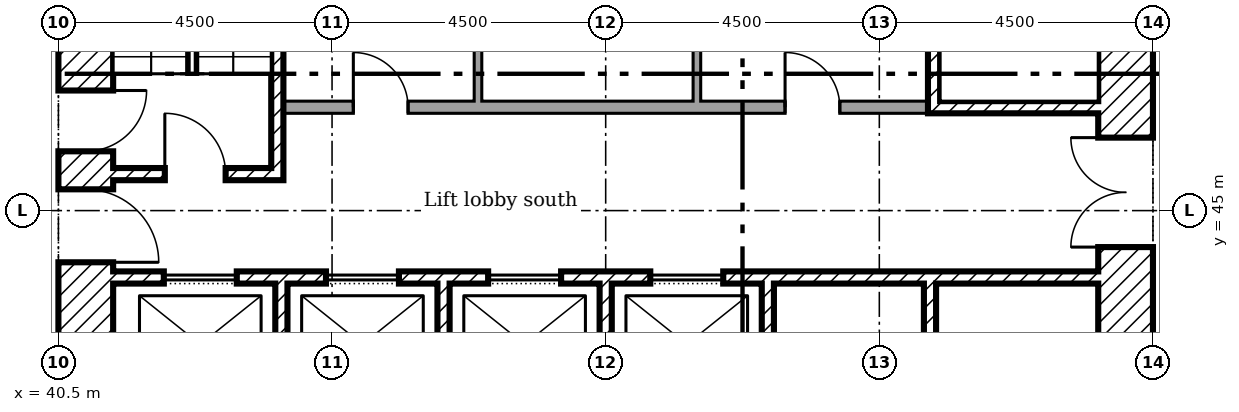
"""IFC4 building model, lengths in metres.
Left out: names, types, materials, properties, quantities, classifications, styles, units other than length and angle.
Written with IfcOpenShell. Run it as: python <this file> out.ifc"""

import sys

from ifc_helpers import new_model, si_unit, direction, frame, frame_2d, origin, place, context, subcontext, project, spatial, rectangle, extrude, element, fill, save


model = new_model("IFC4")
c1 = context("Model", 3, precision=1e-05, world=origin(), true_north=direction((0.0, 1.0)))
c2 = subcontext(c1, "Body", "Model", "MODEL_VIEW")
j1 = project(units=[si_unit("LENGTHUNIT", "METRE"), si_unit("PLANEANGLEUNIT", "RADIAN")], contexts=[c1])
p1 = place(None, origin())
s1 = spatial("IfcSite", under=j1, at=p1, CompositionType="ELEMENT")
p2 = place(p1, origin())
s2 = spatial("IfcBuilding", under=s1, at=p2, CompositionType="ELEMENT")
p3 = place(p2, frame((0.0, 0.0, 21.0)))
s3 = spatial("IfcBuildingStorey", under=s2, at=p3, CompositionType="ELEMENT", Elevation=21.0)
p4 = place(p3, frame((58.05, 40.5, 0.0), z_axis=(0.0, 0.0, 1.0), x_axis=(0.0, 1.0, 0.0)))
e1 = element("IfcWall", 1, at=p4, inside=s3, PredefinedType="SHEAR", context=c2, shape_type="SweptSolid", body=[
    extrude(rectangle(XDim=18.0, YDim=0.9, at=frame_2d((9.0, 0.0))), origin(), (0.0, 0.0, 1.0), 4.125),
])
p5 = place(p4, frame((13.15, 0.0, 0.0)))
e2 = element("IfcOpeningElement", 2, at=p5, cuts=e1, PredefinedType="OPENING", context=c2, shape_type="SweptSolid", body=[
    extrude(rectangle(XDim=1.2, YDim=2.1, at=frame_2d((0.6, 1.05))), frame((0.0, 0.46, 0.0), z_axis=(0.0, -1.0, 0.0), x_axis=(1.0, 0.0, 0.0)), (0.0, 0.0, 1.0), 0.92),
])
p6 = place(p4, frame((3.9, 0.0, 0.0)))
e3 = element("IfcOpeningElement", 3, at=p6, cuts=e1, PredefinedType="OPENING", context=c2, shape_type="SweptSolid", body=[
    extrude(rectangle(XDim=1.8, YDim=2.1, at=frame_2d((0.9, 1.05))), frame((0.0, 0.46, 0.0), z_axis=(0.0, -1.0, 0.0), x_axis=(1.0, 0.0, 0.0)), (0.0, 0.0, 1.0), 0.92),
])
p7 = place(p4, frame((11.525, 0.0, 0.0)))
e4 = element("IfcOpeningElement", 4, at=p7, cuts=e1, PredefinedType="OPENING", context=c2, shape_type="SweptSolid", body=[
    extrude(rectangle(XDim=1.0, YDim=2.1, at=frame_2d((0.5, 1.05))), frame((0.0, 0.46, 0.0), z_axis=(0.0, -1.0, 0.0), x_axis=(1.0, 0.0, 0.0)), (0.0, 0.0, 1.0), 0.92),
])
p8 = place(p3, frame((40.95, 40.5, 0.0), z_axis=(0.0, 0.0, 1.0), x_axis=(0.0, 1.0, 0.0)))
e5 = element("IfcWall", 5, at=p8, inside=s3, PredefinedType="SHEAR", context=c2, shape_type="SweptSolid", body=[
    extrude(rectangle(XDim=18.0, YDim=0.9, at=frame_2d((9.0, 0.0))), origin(), (0.0, 0.0, 1.0), 4.125),
])
p9 = place(p8, frame((3.65, 0.0, 0.0)))
e6 = element("IfcOpeningElement", 6, at=p9, cuts=e5, PredefinedType="OPENING", context=c2, shape_type="SweptSolid", body=[
    extrude(rectangle(XDim=1.2, YDim=2.1, at=frame_2d((0.6, 1.05))), frame((0.0, 0.46, 0.0), z_axis=(0.0, -1.0, 0.0), x_axis=(1.0, 0.0, 0.0)), (0.0, 0.0, 1.0), 0.92),
])
p10 = place(p8, frame((5.475, 0.0, 0.0)))
e7 = element("IfcOpeningElement", 7, at=p10, cuts=e5, PredefinedType="OPENING", context=c2, shape_type="SweptSolid", body=[
    extrude(rectangle(XDim=1.0, YDim=2.1, at=frame_2d((0.5, 1.05))), frame((0.0, 0.46, 0.0), z_axis=(0.0, -1.0, 0.0), x_axis=(1.0, 0.0, 0.0)), (0.0, 0.0, 1.0), 0.92),
])
p11 = place(p8, frame((12.3, 0.0, 0.0)))
e8 = element("IfcOpeningElement", 8, at=p11, cuts=e5, PredefinedType="OPENING", context=c2, shape_type="SweptSolid", body=[
    extrude(rectangle(XDim=1.0, YDim=2.1, at=frame_2d((0.5, 1.05))), frame((0.0, 0.46, 0.0), z_axis=(0.0, -1.0, 0.0), x_axis=(1.0, 0.0, 0.0)), (0.0, 0.0, 1.0), 0.92),
])
for number, where, z_axis, x_axis in (
    (9, (44.167, 41.4, 0.0), (0.0, 0.0, 1.0), (0.0, 1.0, 0.0)),
    (10, (46.833, 41.4, 0.0), (0.0, 0.0, 1.0), (0.0, 1.0, 0.0)),
    (11, (49.5, 41.4, 0.0), (0.0, 0.0, 1.0), (0.0, 1.0, 0.0)),
    (12, (52.167, 41.4, 0.0), (0.0, 0.0, 1.0), (0.0, 1.0, 0.0)),
    (13, (54.833, 41.4, 0.0), (0.0, 0.0, 1.0), (0.0, 1.0, 0.0)),
):
    element("IfcWall", number, at=place(p3, frame(where, z_axis=z_axis, x_axis=x_axis)), inside=s3, PredefinedType="SHEAR", context=c2, shape_type="SweptSolid", body=[
        extrude(rectangle(XDim=2.4, YDim=0.2, at=frame_2d((1.2, 0.0))), origin(), (0.0, 0.0, 1.0), 4.125),
    ])
p12 = place(p3, frame((41.4, 43.9, 0.0)))
e14 = element("IfcWall", 14, at=p12, inside=s3, PredefinedType="SHEAR", context=c2, shape_type="SweptSolid", body=[
    extrude(rectangle(XDim=16.2, YDim=0.2, at=frame_2d((8.1, 0.0))), origin(), (0.0, 0.0, 1.0), 4.125),
])
p13 = place(p12, frame((0.833, 0.0, 0.0)))
e15 = element("IfcOpeningElement", 15, at=p13, cuts=e14, PredefinedType="OPENING", context=c2, shape_type="SweptSolid", body=[
    extrude(rectangle(XDim=1.2, YDim=2.1, at=frame_2d((0.6, 1.05))), frame((0.0, 0.11, 0.0), z_axis=(0.0, -1.0, 0.0), x_axis=(1.0, 0.0, 0.0)), (0.0, 0.0, 1.0), 0.22),
])
p14 = place(p12, frame((3.5, 0.0, 0.0)))
e16 = element("IfcOpeningElement", 16, at=p14, cuts=e14, PredefinedType="OPENING", context=c2, shape_type="SweptSolid", body=[
    extrude(rectangle(XDim=1.2, YDim=2.1, at=frame_2d((0.6, 1.05))), frame((0.0, 0.11, 0.0), z_axis=(0.0, -1.0, 0.0), x_axis=(1.0, 0.0, 0.0)), (0.0, 0.0, 1.0), 0.22),
])
p15 = place(p12, frame((6.167, 0.0, 0.0)))
e17 = element("IfcOpeningElement", 17, at=p15, cuts=e14, PredefinedType="OPENING", context=c2, shape_type="SweptSolid", body=[
    extrude(rectangle(XDim=1.2, YDim=2.1, at=frame_2d((0.6, 1.05))), frame((0.0, 0.11, 0.0), z_axis=(0.0, -1.0, 0.0), x_axis=(1.0, 0.0, 0.0)), (0.0, 0.0, 1.0), 0.22),
])
p16 = place(p12, frame((8.833, 0.0, 0.0)))
e18 = element("IfcOpeningElement", 18, at=p16, cuts=e14, PredefinedType="OPENING", context=c2, shape_type="SweptSolid", body=[
    extrude(rectangle(XDim=1.2, YDim=2.1, at=frame_2d((0.6, 1.05))), frame((0.0, 0.11, 0.0), z_axis=(0.0, -1.0, 0.0), x_axis=(1.0, 0.0, 0.0)), (0.0, 0.0, 1.0), 0.22),
])
p17 = place(p3, frame((44.1, 45.5, 0.0), z_axis=(0.0, 0.0, 1.0), x_axis=(0.0, 1.0, 0.0)))
e19 = element("IfcWall", 19, at=p17, inside=s3, PredefinedType="SHEAR", context=c2, shape_type="SweptSolid", body=[
    extrude(rectangle(XDim=6.9, YDim=0.2, at=frame_2d((3.45, 0.0))), origin(), (0.0, 0.0, 1.0), 4.125),
])
p18 = place(p3, frame((41.4, 45.6, 0.0)))
e20 = element("IfcWall", 20, at=p18, inside=s3, PredefinedType="SHEAR", context=c2, shape_type="SweptSolid", body=[
    extrude(rectangle(XDim=2.6, YDim=0.2, at=frame_2d((1.3, 0.0))), origin(), (0.0, 0.0, 1.0), 4.125),
])
p19 = place(p18, frame((0.85, 0.0, 0.0)))
e21 = element("IfcOpeningElement", 21, at=p19, cuts=e20, PredefinedType="OPENING", context=c2, shape_type="SweptSolid", body=[
    extrude(rectangle(XDim=1.0, YDim=2.1, at=frame_2d((0.5, 1.05))), frame((0.0, 0.11, 0.0), z_axis=(0.0, -1.0, 0.0), x_axis=(1.0, 0.0, 0.0)), (0.0, 0.0, 1.0), 0.22),
])
p20 = place(p3, frame((54.8, 46.7, 0.0)))
e22 = element("IfcWall", 22, at=p20, inside=s3, PredefinedType="SHEAR", context=c2, shape_type="SweptSolid", body=[
    extrude(rectangle(XDim=2.8, YDim=0.2, at=frame_2d((1.4, 0.0))), origin(), (0.0, 0.0, 1.0), 4.125),
])
p21 = place(p3, frame((54.9, 46.8, 0.0), z_axis=(0.0, 0.0, 1.0), x_axis=(0.0, 1.0, 0.0)))
e23 = element("IfcWall", 23, at=p21, inside=s3, PredefinedType="SHEAR", context=c2, shape_type="SweptSolid", body=[
    extrude(rectangle(XDim=6.5, YDim=0.2, at=frame_2d((3.25, 0.0))), origin(), (0.0, 0.0, 1.0), 4.125),
])
p22 = place(p3, frame((44.2, 46.7, 0.0)))
e24 = element("IfcWall", 24, at=p22, inside=s3, PredefinedType="PARTITIONING", context=c2, shape_type="SweptSolid", body=[
    extrude(rectangle(XDim=10.6, YDim=0.2, at=frame_2d((5.3, 0.0))), origin(), (0.0, 0.0, 1.0), 4.125),
])
p23 = place(p22, frame((1.15, 0.0, 0.0)))
e25 = element("IfcOpeningElement", 25, at=p23, cuts=e24, PredefinedType="OPENING", context=c2, shape_type="SweptSolid", body=[
    extrude(rectangle(XDim=0.9, YDim=2.1, at=frame_2d((0.45, 1.05))), frame((0.0, 0.11, 0.0), z_axis=(0.0, -1.0, 0.0), x_axis=(1.0, 0.0, 0.0)), (0.0, 0.0, 1.0), 0.22),
])
p24 = place(p22, frame((8.25, 0.0, 0.0)))
e26 = element("IfcOpeningElement", 26, at=p24, cuts=e24, PredefinedType="OPENING", context=c2, shape_type="SweptSolid", body=[
    extrude(rectangle(XDim=0.9, YDim=2.1, at=frame_2d((0.45, 1.05))), frame((0.0, 0.11, 0.0), z_axis=(0.0, -1.0, 0.0), x_axis=(1.0, 0.0, 0.0)), (0.0, 0.0, 1.0), 0.22),
])
p25 = place(p3, frame((47.4, 46.8, 0.0), z_axis=(0.0, 0.0, 1.0), x_axis=(0.0, 1.0, 0.0)))
e27 = element("IfcWall", 27, at=p25, inside=s3, PredefinedType="PARTITIONING", context=c2, shape_type="SweptSolid", body=[
    extrude(rectangle(XDim=5.0, YDim=0.125, at=frame_2d((2.5, 0.0))), origin(), (0.0, 0.0, 1.0), 4.125),
])
p26 = place(p3, frame((51.0, 46.8, 0.0), z_axis=(0.0, 0.0, 1.0), x_axis=(0.0, 1.0, 0.0)))
e28 = element("IfcWall", 28, at=p26, inside=s3, PredefinedType="PARTITIONING", context=c2, shape_type="SweptSolid", body=[
    extrude(rectangle(XDim=2.262, YDim=0.125, at=frame_2d((1.131, 0.0))), origin(), (0.0, 0.0, 1.0), 4.125),
])
p27 = place(p6, origin())
e29 = element("IfcDoor", 29, at=p27, inside=s3, OperationType="DOUBLE_DOOR_SINGLE_SWING", PredefinedType="DOOR", context=c2, shape_type="SweptSolid", body=[
    extrude(rectangle(XDim=1.8, YDim=2.1, at=frame_2d((0.9, 1.05))), frame((0.0, 0.025, 0.0), z_axis=(0.0, -1.0, 0.0), x_axis=(1.0, 0.0, 0.0)), (0.0, 0.0, 1.0), 0.05),
])
fill(e3, e29)
p28 = place(p9, frame((1.2, 0.0, 0.0), x_axis=(-1.0, 0.0, 0.0)))
e30 = element("IfcDoor", 30, at=p28, inside=s3, OperationType="SINGLE_SWING_LEFT", PredefinedType="DOOR", context=c2, shape_type="SweptSolid", body=[
    extrude(rectangle(XDim=1.2, YDim=2.1, at=frame_2d((0.6, 1.05))), frame((0.0, 0.025, 0.0), z_axis=(0.0, -1.0, 0.0), x_axis=(1.0, 0.0, 0.0)), (0.0, 0.0, 1.0), 0.05),
])
fill(e6, e30)
p29 = place(p19, origin())
e31 = element("IfcDoor", 31, at=p29, inside=s3, OperationType="SINGLE_SWING_RIGHT", PredefinedType="DOOR", context=c2, shape_type="SweptSolid", body=[
    extrude(rectangle(XDim=1.0, YDim=2.1, at=frame_2d((0.5, 1.05))), frame((0.0, 0.025, 0.0), z_axis=(0.0, -1.0, 0.0), x_axis=(1.0, 0.0, 0.0)), (0.0, 0.0, 1.0), 0.05),
])
fill(e21, e31)
p30 = place(p10, frame((1.0, 0.0, 0.0), x_axis=(-1.0, 0.0, 0.0)))
e32 = element("IfcDoor", 32, at=p30, inside=s3, OperationType="SINGLE_SWING_RIGHT", PredefinedType="DOOR", context=c2, shape_type="SweptSolid", body=[
    extrude(rectangle(XDim=1.0, YDim=2.1, at=frame_2d((0.5, 1.05))), frame((0.0, 0.025, 0.0), z_axis=(0.0, -1.0, 0.0), x_axis=(1.0, 0.0, 0.0)), (0.0, 0.0, 1.0), 0.05),
])
fill(e7, e32)
p31 = place(p23, origin())
e33 = element("IfcDoor", 33, at=p31, inside=s3, OperationType="SINGLE_SWING_RIGHT", PredefinedType="DOOR", context=c2, shape_type="SweptSolid", body=[
    extrude(rectangle(XDim=0.9, YDim=2.1, at=frame_2d((0.45, 1.05))), frame((0.0, 0.025, 0.0), z_axis=(0.0, -1.0, 0.0), x_axis=(1.0, 0.0, 0.0)), (0.0, 0.0, 1.0), 0.05),
])
fill(e25, e33)
p32 = place(p24, origin())
e34 = element("IfcDoor", 34, at=p32, inside=s3, OperationType="SINGLE_SWING_RIGHT", PredefinedType="DOOR", context=c2, shape_type="SweptSolid", body=[
    extrude(rectangle(XDim=0.9, YDim=2.1, at=frame_2d((0.45, 1.05))), frame((0.0, 0.025, 0.0), z_axis=(0.0, -1.0, 0.0), x_axis=(1.0, 0.0, 0.0)), (0.0, 0.0, 1.0), 0.05),
])
fill(e26, e34)
p33 = place(p13, origin())
e35 = element("IfcDoor", 35, at=p33, inside=s3, OperationType="SLIDING_TO_LEFT", PredefinedType="DOOR", context=c2, shape_type="SweptSolid", body=[
    extrude(rectangle(XDim=1.2, YDim=2.1, at=frame_2d((0.6, 1.05))), frame((0.0, 0.025, 0.0), z_axis=(0.0, -1.0, 0.0), x_axis=(1.0, 0.0, 0.0)), (0.0, 0.0, 1.0), 0.05),
])
fill(e15, e35)
p34 = place(p14, origin())
e36 = element("IfcDoor", 36, at=p34, inside=s3, OperationType="SLIDING_TO_LEFT", PredefinedType="DOOR", context=c2, shape_type="SweptSolid", body=[
    extrude(rectangle(XDim=1.2, YDim=2.1, at=frame_2d((0.6, 1.05))), frame((0.0, 0.025, 0.0), z_axis=(0.0, -1.0, 0.0), x_axis=(1.0, 0.0, 0.0)), (0.0, 0.0, 1.0), 0.05),
])
fill(e16, e36)
p35 = place(p15, origin())
e37 = element("IfcDoor", 37, at=p35, inside=s3, OperationType="SLIDING_TO_LEFT", PredefinedType="DOOR", context=c2, shape_type="SweptSolid", body=[
    extrude(rectangle(XDim=1.2, YDim=2.1, at=frame_2d((0.6, 1.05))), frame((0.0, 0.025, 0.0), z_axis=(0.0, -1.0, 0.0), x_axis=(1.0, 0.0, 0.0)), (0.0, 0.0, 1.0), 0.05),
])
fill(e17, e37)
p36 = place(p16, origin())
e38 = element("IfcDoor", 38, at=p36, inside=s3, OperationType="SLIDING_TO_LEFT", PredefinedType="DOOR", context=c2, shape_type="SweptSolid", body=[
    extrude(rectangle(XDim=1.2, YDim=2.1, at=frame_2d((0.6, 1.05))), frame((0.0, 0.025, 0.0), z_axis=(0.0, -1.0, 0.0), x_axis=(1.0, 0.0, 0.0)), (0.0, 0.0, 1.0), 0.05),
])
fill(e18, e38)
save(model, sys.argv[1])
